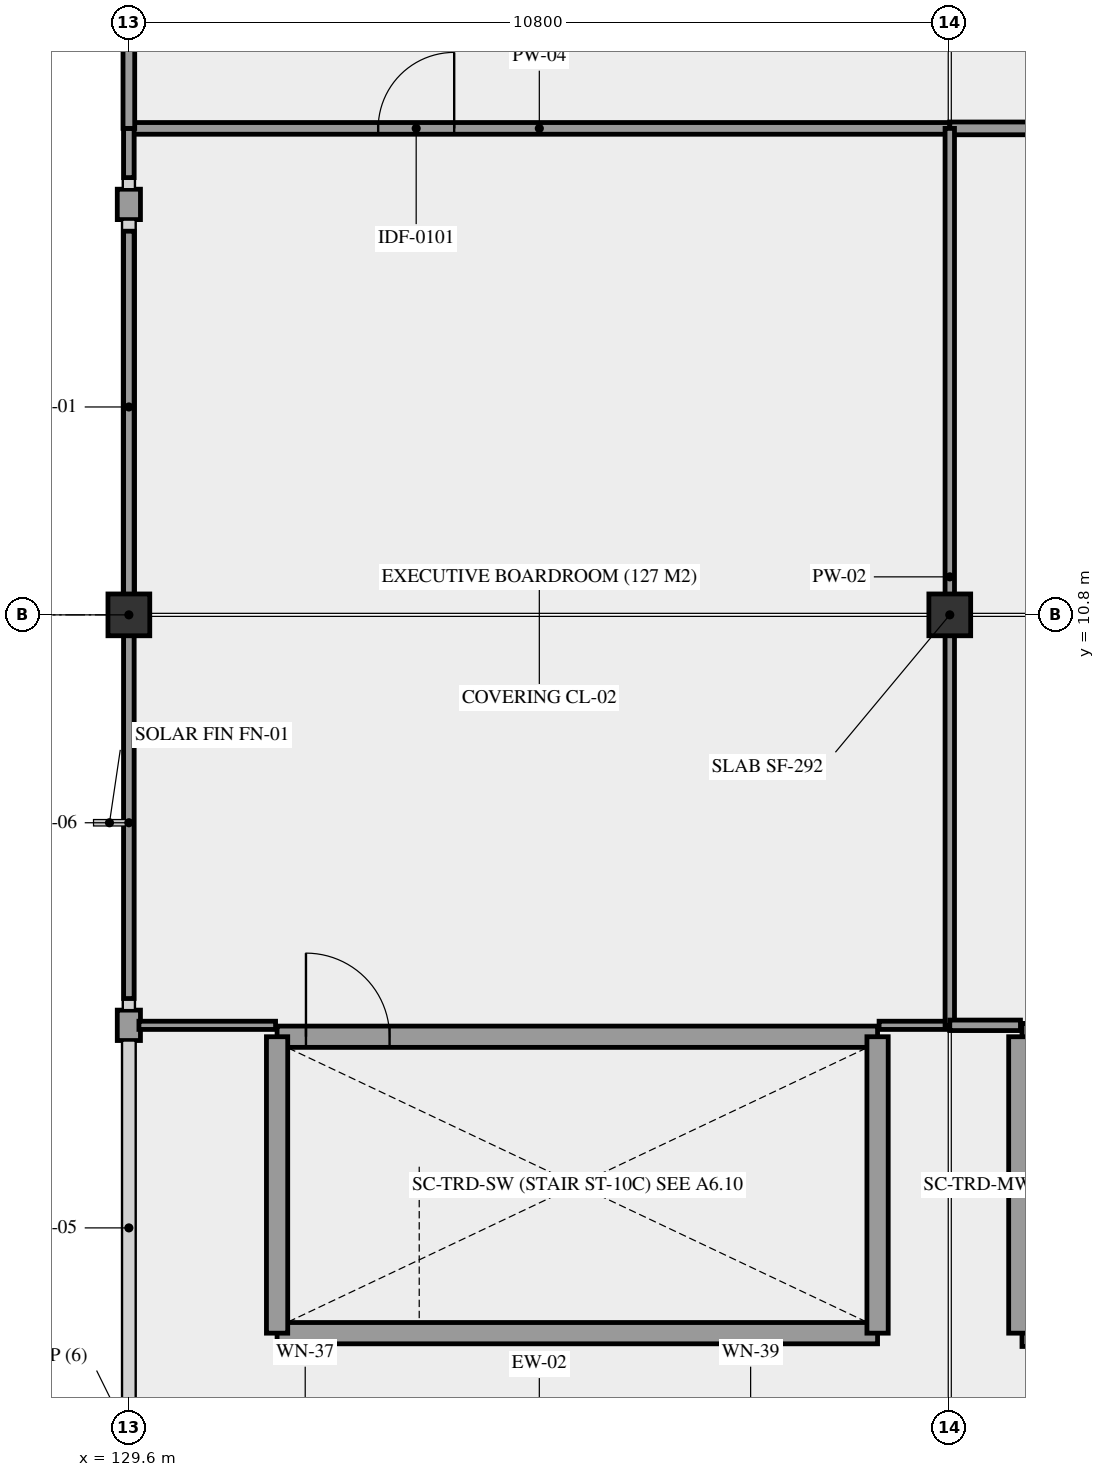
"""IFC4 building model, lengths in metres.
Left out: names, types, materials, properties, quantities, classifications, styles, units other than length and angle.
Written with IfcOpenShell. Run it as: python <this file> out.ifc"""

import sys

from ifc_helpers import new_model, si_unit, direction, frame, frame_2d, origin, origin_2d, place, context, subcontext, project, spatial, rectangle, extrude, element, fill, save


model = new_model("IFC4")
c1 = context("Model", 3, precision=1e-05, world=origin(), true_north=direction((0.0, 1.0)))
c2 = subcontext(c1, "Body", "Model", "MODEL_VIEW")
j1 = project(units=[si_unit("LENGTHUNIT", "METRE"), si_unit("PLANEANGLEUNIT", "RADIAN")], contexts=[c1])
p1 = place(None, origin())
s1 = spatial("IfcSite", under=j1, at=p1, CompositionType="ELEMENT")
p2 = place(p1, origin())
s2 = spatial("IfcBuilding", under=s1, at=p2, CompositionType="ELEMENT")
p3 = place(p2, frame((0.0, 0.0, 14.76)))
s3 = spatial("IfcBuildingStorey", under=s2, at=p3, CompositionType="ELEMENT", Elevation=14.76)
for number, where, z_axis, x_axis in (
    (1, (129.6, 10.8, 0.0), (0.0, 0.0, 1.0), (1.0, 0.0, 0.0)),
    (2, (140.4, 10.8, 0.0), (0.0, 0.0, 1.0), (1.0, 0.0, 0.0)),
):
    element("IfcColumn", number, at=place(p3, frame(where, z_axis=z_axis, x_axis=x_axis)), inside=s3, PredefinedType="COLUMN", context=c2, shape_type="SweptSolid", body=[
        extrude(rectangle(XDim=0.55, YDim=0.55, at=origin_2d()), origin(), (0.0, 0.0, 1.0), 4.32),
    ])
p4 = place(p3, frame((129.6, 5.2, 0.0), z_axis=(0.0, 0.0, 1.0), x_axis=(0.0, 1.0, 0.0)))
e3 = element("IfcWall", 3, at=p4, inside=s3, PredefinedType="STANDARD", context=c2, shape_type="SweptSolid", body=[
    extrude(rectangle(XDim=0.4, YDim=0.305, at=frame_2d((0.2, 0.0))), origin(), (0.0, 0.0, 1.0), 3.17),
])
p5 = place(p3, frame((129.6, 16.0, 0.0), z_axis=(0.0, 0.0, 1.0), x_axis=(0.0, 1.0, 0.0)))
e4 = element("IfcWall", 4, at=p5, inside=s3, PredefinedType="STANDARD", context=c2, shape_type="SweptSolid", body=[
    extrude(rectangle(XDim=0.4, YDim=0.305, at=frame_2d((0.2, 0.0))), origin(), (0.0, 0.0, 1.0), 3.17),
])
p6 = place(p3, frame((131.55, 1.35, 0.0), z_axis=(0.0, 0.0, 1.0), x_axis=(1.0, 0.0, 0.0)))
e5 = element("IfcWall", 5, at=p6, inside=s3, PredefinedType="SHEAR", context=c2, shape_type="SweptSolid", body=[
    extrude(rectangle(XDim=7.9, YDim=0.28, at=frame_2d((3.95, 0.0))), origin(), (0.0, 0.0, 1.0), 4.32),
])
p7 = place(p3, frame((131.55, 5.25, 0.0), z_axis=(0.0, 0.0, 1.0), x_axis=(1.0, 0.0, 0.0)))
e6 = element("IfcWall", 6, at=p7, inside=s3, PredefinedType="SHEAR", context=c2, shape_type="SweptSolid", body=[
    extrude(rectangle(XDim=7.9, YDim=0.28, at=frame_2d((3.95, 0.0))), origin(), (0.0, 0.0, 1.0), 4.32),
])
p8 = place(p7, frame((0.38, 0.0, 0.0)))
e7 = element("IfcOpeningElement", 7, at=p8, cuts=e6, PredefinedType="OPENING", context=c2, shape_type="SweptSolid", body=[
    extrude(rectangle(XDim=1.1, YDim=2.2, at=frame_2d((0.55, 1.1))), frame((0.0, 0.15, 0.0), z_axis=(0.0, -1.0, 0.0), x_axis=(1.0, 0.0, 0.0)), (0.0, 0.0, 1.0), 0.3),
])
for number, where, z_axis, x_axis in (
    (8, (131.55, 1.35, 0.0), (0.0, 0.0, 1.0), (0.0, 1.0, 0.0)),
    (9, (139.45, 1.35, 0.0), (0.0, 0.0, 1.0), (0.0, 1.0, 0.0)),
):
    element("IfcWall", number, at=place(p3, frame(where, z_axis=z_axis, x_axis=x_axis)), inside=s3, PredefinedType="SHEAR", context=c2, shape_type="SweptSolid", body=[
        extrude(rectangle(XDim=3.9, YDim=0.28, at=frame_2d((1.95, 0.0))), origin(), (0.0, 0.0, 1.0), 4.32),
    ])
p9 = place(p3, frame((141.35, 1.35, 0.0), z_axis=(0.0, 0.0, 1.0), x_axis=(1.0, 0.0, 0.0)))
e10 = element("IfcWall", 10, at=p9, inside=s3, PredefinedType="SHEAR", context=c2, shape_type="SweptSolid", body=[
    extrude(rectangle(XDim=7.9, YDim=0.35, at=frame_2d((3.95, 0.0))), origin(), (0.0, 0.0, 1.0), 4.32),
])
p10 = place(p3, frame((141.35, 5.25, 0.0), z_axis=(0.0, 0.0, 1.0), x_axis=(1.0, 0.0, 0.0)))
e11 = element("IfcWall", 11, at=p10, inside=s3, PredefinedType="SHEAR", context=c2, shape_type="SweptSolid", body=[
    extrude(rectangle(XDim=7.9, YDim=0.35, at=frame_2d((3.95, 0.0))), origin(), (0.0, 0.0, 1.0), 4.32),
])
p11 = place(p10, frame((0.38, 0.0, 0.0)))
e12 = element("IfcOpeningElement", 12, at=p11, cuts=e11, PredefinedType="OPENING", context=c2, shape_type="SweptSolid", body=[
    extrude(rectangle(XDim=1.1, YDim=2.2, at=frame_2d((0.55, 1.1))), frame((0.0, 0.185, 0.0), z_axis=(0.0, -1.0, 0.0), x_axis=(1.0, 0.0, 0.0)), (0.0, 0.0, 1.0), 0.37),
])
p12 = place(p3, frame((141.35, 1.35, 0.0), z_axis=(0.0, 0.0, 1.0), x_axis=(0.0, 1.0, 0.0)))
e13 = element("IfcWall", 13, at=p12, inside=s3, PredefinedType="SHEAR", context=c2, shape_type="SweptSolid", body=[
    extrude(rectangle(XDim=3.9, YDim=0.35, at=frame_2d((1.95, 0.0))), origin(), (0.0, 0.0, 1.0), 4.32),
])
p13 = place(p3, frame((129.6, 17.2, 0.0), z_axis=(0.0, 0.0, 1.0), x_axis=(1.0, 0.0, 0.0)))
e14 = element("IfcWall", 14, at=p13, inside=s3, PredefinedType="PARTITIONING", context=c2, shape_type="SweptSolid", body=[
    extrude(rectangle(XDim=10.8, YDim=0.154, at=frame_2d((5.4, 0.0))), origin(), (0.0, 0.0, 1.0), 2.87),
])
p14 = place(p13, frame((3.28, 0.0, 0.0)))
e15 = element("IfcOpeningElement", 15, at=p14, cuts=e14, PredefinedType="OPENING", context=c2, shape_type="SweptSolid", body=[
    extrude(rectangle(XDim=1.0, YDim=2.15, at=frame_2d((0.5, 1.075))), frame((0.0, 0.087, 0.0), z_axis=(0.0, -1.0, 0.0), x_axis=(1.0, 0.0, 0.0)), (0.0, 0.0, 1.0), 0.174),
])
p15 = place(p3, frame((140.4, 17.2, 0.0), z_axis=(0.0, 0.0, 1.0), x_axis=(1.0, 0.0, 0.0)))
e16 = element("IfcWall", 16, at=p15, inside=s3, PredefinedType="PARTITIONING", context=c2, shape_type="SweptSolid", body=[
    extrude(rectangle(XDim=10.8, YDim=0.168, at=frame_2d((5.4, 0.0))), origin(), (0.0, 0.0, 1.0), 2.87),
])
p16 = place(p15, frame((2.15, 0.0, 0.0)))
e17 = element("IfcOpeningElement", 17, at=p16, cuts=e16, PredefinedType="OPENING", context=c2, shape_type="SweptSolid", body=[
    extrude(rectangle(XDim=1.1, YDim=2.2, at=frame_2d((0.55, 1.1))), frame((0.0, 0.094, 0.0), z_axis=(0.0, -1.0, 0.0), x_axis=(1.0, 0.0, 0.0)), (0.0, 0.0, 1.0), 0.188),
])
p17 = place(p3, frame((129.732, 5.4, 0.0), z_axis=(0.0, 0.0, 1.0), x_axis=(1.0, 0.0, 0.0)))
e18 = element("IfcWall", 18, at=p17, inside=s3, PredefinedType="PARTITIONING", context=c2, shape_type="SweptSolid", body=[
    extrude(rectangle(XDim=1.798, YDim=0.108, at=frame_2d((0.899, 0.0))), origin(), (0.0, 0.0, 1.0), 2.87),
])
p18 = place(p3, frame((139.47, 5.4, 0.0), z_axis=(0.0, 0.0, 1.0), x_axis=(1.0, 0.0, 0.0)))
e19 = element("IfcWall", 19, at=p18, inside=s3, PredefinedType="PARTITIONING", context=c2, shape_type="SweptSolid", body=[
    extrude(rectangle(XDim=0.93, YDim=0.108, at=frame_2d((0.465, 0.0))), origin(), (0.0, 0.0, 1.0), 2.87),
])
p19 = place(p3, frame((129.6, 5.752, 0.0), z_axis=(0.0, 0.0, 1.0), x_axis=(0.0, 1.0, 0.0)))
e20 = element("IfcWall", 20, at=p19, inside=s3, PredefinedType="PARTITIONING", context=c2, shape_type="SweptSolid", body=[
    extrude(rectangle(XDim=10.095, YDim=0.138, at=frame_2d((5.047, 0.0))), origin(), (0.0, 0.0, 1.0), 2.87),
])
p20 = place(p3, frame((129.6, 16.552, 0.0), z_axis=(0.0, 0.0, 1.0), x_axis=(0.0, 1.0, 0.0)))
e21 = element("IfcWall", 21, at=p20, inside=s3, PredefinedType="PARTITIONING", context=c2, shape_type="SweptSolid", body=[
    extrude(rectangle(XDim=0.647, YDim=0.138, at=frame_2d((0.324, 0.0))), origin(), (0.0, 0.0, 1.0), 2.87),
])
p21 = place(p3, frame((129.6, 17.2, 0.0), z_axis=(0.0, 0.0, 1.0), x_axis=(0.0, 1.0, 0.0)))
e22 = element("IfcWall", 22, at=p21, inside=s3, PredefinedType="PARTITIONING", context=c2, shape_type="SweptSolid", body=[
    extrude(rectangle(XDim=4.4, YDim=0.154, at=frame_2d((2.2, 0.0))), origin(), (0.0, 0.0, 1.0), 2.87),
])
p22 = place(p3, frame((140.4, 5.4, 0.0), z_axis=(0.0, 0.0, 1.0), x_axis=(0.0, 1.0, 0.0)))
e23 = element("IfcWall", 23, at=p22, inside=s3, PredefinedType="PARTITIONING", context=c2, shape_type="SweptSolid", body=[
    extrude(rectangle(XDim=11.8, YDim=0.124, at=frame_2d((5.9, 0.0))), origin(), (0.0, 0.0, 1.0), 2.87),
])
p23 = place(p3, frame((140.4, 5.4, 0.0), z_axis=(0.0, 0.0, 1.0), x_axis=(1.0, 0.0, 0.0)))
e24 = element("IfcWall", 24, at=p23, inside=s3, PredefinedType="PARTITIONING", context=c2, shape_type="SweptSolid", body=[
    extrude(rectangle(XDim=0.93, YDim=0.138, at=frame_2d((0.465, 0.0))), origin(), (0.0, 0.0, 1.0), 2.87),
])
p24 = place(p8, origin())
e25 = element("IfcDoor", 25, at=p24, inside=s3, OperationType="SINGLE_SWING_LEFT", PredefinedType="DOOR", context=c2, shape_type="SweptSolid", body=[
    extrude(rectangle(XDim=1.1, YDim=2.2, at=frame_2d((0.55, 1.1))), frame((0.0, 0.025, 0.0), z_axis=(0.0, -1.0, 0.0), x_axis=(1.0, 0.0, 0.0)), (0.0, 0.0, 1.0), 0.05),
])
fill(e7, e25)
p25 = place(p14, origin())
e26 = element("IfcDoor", 26, at=p25, inside=s3, OperationType="SINGLE_SWING_RIGHT", PredefinedType="DOOR", context=c2, shape_type="SweptSolid", body=[
    extrude(rectangle(XDim=1.0, YDim=2.15, at=frame_2d((0.5, 1.075))), frame((0.0, 0.025, 0.0), z_axis=(0.0, -1.0, 0.0), x_axis=(1.0, 0.0, 0.0)), (0.0, 0.0, 1.0), 0.05),
])
fill(e15, e26)
save(model, sys.argv[1])
